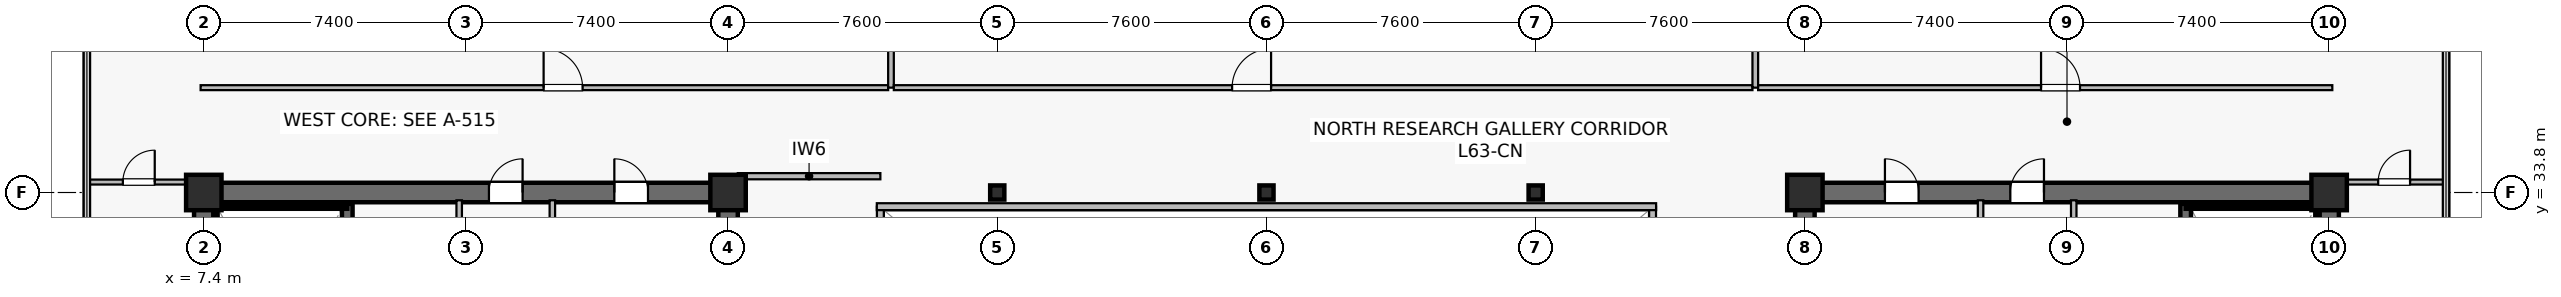
"""IFC4 building model, lengths in metres.
Left out: names, types, materials, properties, quantities, classifications, styles, units other than length and angle.
Written with IfcOpenShell. Run it as: python <this file> out.ifc"""

import sys

from ifc_helpers import new_model, si_unit, direction, frame, frame_2d, origin, origin_2d, place, context, subcontext, project, spatial, rectangle, hollow_rectangle, extrude, source, transform, mapped, element, fill, save


model = new_model("IFC4")
c1 = context("Model", 3, precision=1e-05, world=origin(), true_north=direction((0.0, 1.0)))
c2 = subcontext(c1, "Body", "Model", "MODEL_VIEW")
j1 = project(units=[si_unit("LENGTHUNIT", "METRE"), si_unit("PLANEANGLEUNIT", "RADIAN")], contexts=[c1])
p1 = place(None, origin())
s1 = spatial("IfcSite", under=j1, at=p1, CompositionType="ELEMENT")
p2 = place(p1, origin())
s2 = spatial("IfcBuilding", under=s1, at=p2, CompositionType="ELEMENT")
p3 = place(p2, frame((0.0, 0.0, 262.9)))
s3 = spatial("IfcBuildingStorey", under=s2, at=p3, CompositionType="ELEMENT", Elevation=262.9)
p4 = place(p3, frame((7.125, 33.8, 0.0), z_axis=(0.0, 0.0, 1.0), x_axis=(1.0, 0.0, 0.0)))
e1 = element("IfcWall", 1, at=p4, inside=s3, PredefinedType="SHEAR", context=c2, shape_type="SweptSolid", body=[
    extrude(rectangle(XDim=15.35, YDim=0.55, at=frame_2d((7.675, 0.0))), origin(), (0.0, 0.0, 1.0), 3.8),
])
p5 = place(p4, frame((8.325, 0.0, 0.0)))
e2 = element("IfcOpeningElement", 2, at=p5, cuts=e1, PredefinedType="OPENING", context=c2, shape_type="SweptSolid", body=[
    extrude(rectangle(XDim=0.95, YDim=2.15, at=frame_2d((0.475, 1.075))), frame((0.0, 0.285, 0.0), z_axis=(0.0, -1.0, 0.0), x_axis=(1.0, 0.0, 0.0)), (0.0, 0.0, 1.0), 0.57),
])
p6 = place(p4, frame((11.865, 0.0, 0.0)))
e3 = element("IfcOpeningElement", 3, at=p6, cuts=e1, PredefinedType="OPENING", context=c2, shape_type="SweptSolid", body=[
    extrude(rectangle(XDim=0.95, YDim=2.15, at=frame_2d((0.475, 1.075))), frame((0.0, 0.285, 0.0), z_axis=(0.0, -1.0, 0.0), x_axis=(1.0, 0.0, 0.0)), (0.0, 0.0, 1.0), 0.57),
])
p7 = place(p3, frame((7.4, 15.075, 0.0), z_axis=(0.0, 0.0, 1.0), x_axis=(0.0, 1.0, 0.0)))
e4 = element("IfcWall", 4, at=p7, inside=s3, PredefinedType="SHEAR", context=c2, shape_type="SweptSolid", body=[
    extrude(rectangle(XDim=18.45, YDim=0.55, at=frame_2d((9.225, 0.0))), origin(), (0.0, 0.0, 1.0), 3.8),
])
p8 = place(p3, frame((22.2, 15.075, 0.0), z_axis=(0.0, 0.0, 1.0), x_axis=(0.0, 1.0, 0.0)))
e5 = element("IfcWall", 5, at=p8, inside=s3, PredefinedType="SHEAR", context=c2, shape_type="SweptSolid", body=[
    extrude(rectangle(XDim=18.45, YDim=0.55, at=frame_2d((9.225, 0.0))), origin(), (0.0, 0.0, 1.0), 3.8),
])
p9 = place(p8, frame((3.475, 0.0, 0.0)))
e6 = element("IfcOpeningElement", 6, at=p9, cuts=e5, PredefinedType="OPENING", context=c2, shape_type="SweptSolid", body=[
    extrude(rectangle(XDim=1.42, YDim=2.2, at=frame_2d((0.71, 1.1))), frame((0.0, 0.285, 0.0), z_axis=(0.0, -1.0, 0.0), x_axis=(1.0, 0.0, 0.0)), (0.0, 0.0, 1.0), 0.57),
])
p10 = place(p3, frame((11.45, 24.85, 0.0), z_axis=(0.0, 0.0, 1.0), x_axis=(0.0, 1.0, 0.0)))
e7 = element("IfcWall", 7, at=p10, inside=s3, PredefinedType="SHEAR", context=c2, shape_type="SweptSolid", body=[
    extrude(rectangle(XDim=8.63, YDim=0.3, at=frame_2d((4.315, 0.0))), origin(), (0.0, 0.0, 1.0), 3.8),
])
p11 = place(p10, frame((0.42, 0.0, 0.0)))
e8 = element("IfcOpeningElement", 8, at=p11, cuts=e7, PredefinedType="OPENING", context=c2, shape_type="SweptSolid", body=[
    extrude(rectangle(XDim=1.1, YDim=2.15, at=frame_2d((0.55, 1.075))), frame((0.0, 0.16, 0.0), z_axis=(0.0, -1.0, 0.0), x_axis=(1.0, 0.0, 0.0)), (0.0, 0.0, 1.0), 0.32),
])
p12 = place(p3, frame((7.73, 33.4, 0.0), z_axis=(0.0, 0.0, 1.0), x_axis=(1.0, 0.0, 0.0)))
e9 = element("IfcWall", 9, at=p12, inside=s3, PredefinedType="SOLIDWALL", context=c2, shape_type="SweptSolid", body=[
    extrude(rectangle(XDim=3.72, YDim=0.12, at=frame_2d((1.86, 0.0))), origin(), (0.0, 0.0, 1.0), 3.8),
])
p13 = place(p3, frame((7.73, 25.0, 0.0), z_axis=(0.0, 0.0, 1.0), x_axis=(0.0, 1.0, 0.0)))
e10 = element("IfcWall", 10, at=p13, inside=s3, PredefinedType="SOLIDWALL", context=c2, shape_type="SweptSolid", body=[
    extrude(rectangle(XDim=8.32, YDim=0.12, at=frame_2d((4.16, 0.0))), origin(), (0.0, 0.0, 1.0), 3.8),
])
p14 = place(p3, frame((52.325, 33.8, 0.0), z_axis=(0.0, 0.0, 1.0), x_axis=(1.0, 0.0, 0.0)))
e11 = element("IfcWall", 11, at=p14, inside=s3, PredefinedType="SHEAR", context=c2, shape_type="SweptSolid", body=[
    extrude(rectangle(XDim=15.35, YDim=0.55, at=frame_2d((7.675, 0.0))), origin(), (0.0, 0.0, 1.0), 3.8),
])
p15 = place(p14, frame((6.075, 0.0, 0.0)))
e12 = element("IfcOpeningElement", 12, at=p15, cuts=e11, PredefinedType="OPENING", context=c2, shape_type="SweptSolid", body=[
    extrude(rectangle(XDim=0.95, YDim=2.15, at=frame_2d((0.475, 1.075))), frame((0.0, 0.285, 0.0), z_axis=(0.0, -1.0, 0.0), x_axis=(1.0, 0.0, 0.0)), (0.0, 0.0, 1.0), 0.57),
])
p16 = place(p14, frame((2.535, 0.0, 0.0)))
e13 = element("IfcOpeningElement", 13, at=p16, cuts=e11, PredefinedType="OPENING", context=c2, shape_type="SweptSolid", body=[
    extrude(rectangle(XDim=0.95, YDim=2.15, at=frame_2d((0.475, 1.075))), frame((0.0, 0.285, 0.0), z_axis=(0.0, -1.0, 0.0), x_axis=(1.0, 0.0, 0.0)), (0.0, 0.0, 1.0), 0.57),
])
p17 = place(p3, frame((52.6, 15.075, 0.0), z_axis=(0.0, 0.0, 1.0), x_axis=(0.0, 1.0, 0.0)))
e14 = element("IfcWall", 14, at=p17, inside=s3, PredefinedType="SHEAR", context=c2, shape_type="SweptSolid", body=[
    extrude(rectangle(XDim=18.45, YDim=0.55, at=frame_2d((9.225, 0.0))), origin(), (0.0, 0.0, 1.0), 3.8),
])
p18 = place(p17, frame((3.475, 0.0, 0.0)))
e15 = element("IfcOpeningElement", 15, at=p18, cuts=e14, PredefinedType="OPENING", context=c2, shape_type="SweptSolid", body=[
    extrude(rectangle(XDim=1.42, YDim=2.2, at=frame_2d((0.71, 1.1))), frame((0.0, 0.285, 0.0), z_axis=(0.0, -1.0, 0.0), x_axis=(1.0, 0.0, 0.0)), (0.0, 0.0, 1.0), 0.57),
])
p19 = place(p3, frame((67.4, 15.075, 0.0), z_axis=(0.0, 0.0, 1.0), x_axis=(0.0, 1.0, 0.0)))
e16 = element("IfcWall", 16, at=p19, inside=s3, PredefinedType="SHEAR", context=c2, shape_type="SweptSolid", body=[
    extrude(rectangle(XDim=18.45, YDim=0.55, at=frame_2d((9.225, 0.0))), origin(), (0.0, 0.0, 1.0), 3.8),
])
p20 = place(p3, frame((63.35, 24.85, 0.0), z_axis=(0.0, 0.0, 1.0), x_axis=(0.0, 1.0, 0.0)))
e17 = element("IfcWall", 17, at=p20, inside=s3, PredefinedType="SHEAR", context=c2, shape_type="SweptSolid", body=[
    extrude(rectangle(XDim=8.63, YDim=0.3, at=frame_2d((4.315, 0.0))), origin(), (0.0, 0.0, 1.0), 3.8),
])
p21 = place(p20, frame((0.42, 0.0, 0.0)))
e18 = element("IfcOpeningElement", 18, at=p21, cuts=e17, PredefinedType="OPENING", context=c2, shape_type="SweptSolid", body=[
    extrude(rectangle(XDim=1.1, YDim=2.15, at=frame_2d((0.55, 1.075))), frame((0.0, 0.16, 0.0), z_axis=(0.0, -1.0, 0.0), x_axis=(1.0, 0.0, 0.0)), (0.0, 0.0, 1.0), 0.32),
])
p22 = place(p3, frame((63.35, 33.4, 0.0), z_axis=(0.0, 0.0, 1.0), x_axis=(1.0, 0.0, 0.0)))
e19 = element("IfcWall", 19, at=p22, inside=s3, PredefinedType="SOLIDWALL", context=c2, shape_type="SweptSolid", body=[
    extrude(rectangle(XDim=3.72, YDim=0.12, at=frame_2d((1.86, 0.0))), origin(), (0.0, 0.0, 1.0), 3.8),
])
p23 = place(p3, frame((67.07, 25.0, 0.0), z_axis=(0.0, 0.0, 1.0), x_axis=(0.0, 1.0, 0.0)))
e20 = element("IfcWall", 20, at=p23, inside=s3, PredefinedType="SOLIDWALL", context=c2, shape_type="SweptSolid", body=[
    extrude(rectangle(XDim=8.32, YDim=0.12, at=frame_2d((4.16, 0.0))), origin(), (0.0, 0.0, 1.0), 3.8),
])
m1 = source(origin(), c2, "Body", "SweptSolid", [
    extrude(rectangle(XDim=1.0, YDim=1.0, at=origin_2d()), origin(), (0.0, 0.0, 1.0), 4.1),
])
for number, where, z_axis, x_axis in (
    (21, (7.4, 33.8, 0.0), (0.0, 0.0, 1.0), (1.0, 0.0, 0.0)),
    (22, (22.2, 33.8, 0.0), (0.0, 0.0, 1.0), (1.0, 0.0, 0.0)),
    (23, (52.6, 33.8, 0.0), (0.0, 0.0, 1.0), (1.0, 0.0, 0.0)),
    (24, (67.4, 33.8, 0.0), (0.0, 0.0, 1.0), (1.0, 0.0, 0.0)),
):
    element("IfcColumn", number, at=place(p3, frame(where, z_axis=z_axis, x_axis=x_axis)), inside=s3, PredefinedType="COLUMN", context=c2, shape_type="MappedRepresentation", body=[
        mapped(m1, transform((0.0, 0.0, 0.0), scale=1.0)),
    ])
m2 = source(origin(), c2, "Body", "SweptSolid", [
    extrude(hollow_rectangle(XDim=0.4, YDim=0.4, WallThickness=0.019, at=origin_2d()), origin(), (0.0, 0.0, 1.0), 4.1),
])
for number, where, z_axis, x_axis in (
    (25, (29.8, 33.8, 0.0), (0.0, 0.0, 1.0), (1.0, 0.0, 0.0)),
    (26, (37.4, 33.8, 0.0), (0.0, 0.0, 1.0), (1.0, 0.0, 0.0)),
    (27, (45.0, 33.8, 0.0), (0.0, 0.0, 1.0), (1.0, 0.0, 0.0)),
):
    element("IfcColumn", number, at=place(p3, frame(where, z_axis=z_axis, x_axis=x_axis)), inside=s3, PredefinedType="COLUMN", context=c2, shape_type="MappedRepresentation", body=[
        mapped(m2, transform((0.0, 0.0, 0.0), scale=1.0)),
    ])
p24 = place(p3, frame((14.61, 29.65, 0.0), z_axis=(0.0, 0.0, 1.0), x_axis=(0.0, 1.0, 0.0)))
e28 = element("IfcWall", 28, at=p24, inside=s3, PredefinedType="PLUMBINGWALL", context=c2, shape_type="SweptSolid", body=[
    extrude(rectangle(XDim=3.93, YDim=0.155, at=frame_2d((1.965, 0.0))), origin(), (0.0, 0.0, 1.0), 3.197),
])
p25 = place(p3, frame((17.24, 29.65, 0.0), z_axis=(0.0, 0.0, 1.0), x_axis=(0.0, 1.0, 0.0)))
e29 = element("IfcWall", 29, at=p25, inside=s3, PredefinedType="PLUMBINGWALL", context=c2, shape_type="SweptSolid", body=[
    extrude(rectangle(XDim=3.93, YDim=0.155, at=frame_2d((1.965, 0.0))), origin(), (0.0, 0.0, 1.0), 3.8),
])
p26 = place(p3, frame((60.19, 29.65, 0.0), z_axis=(0.0, 0.0, 1.0), x_axis=(0.0, 1.0, 0.0)))
e30 = element("IfcWall", 30, at=p26, inside=s3, PredefinedType="PLUMBINGWALL", context=c2, shape_type="SweptSolid", body=[
    extrude(rectangle(XDim=3.93, YDim=0.155, at=frame_2d((1.965, 0.0))), origin(), (0.0, 0.0, 1.0), 3.197),
])
p27 = place(p3, frame((57.56, 29.65, 0.0), z_axis=(0.0, 0.0, 1.0), x_axis=(0.0, 1.0, 0.0)))
e31 = element("IfcWall", 31, at=p27, inside=s3, PredefinedType="PLUMBINGWALL", context=c2, shape_type="SweptSolid", body=[
    extrude(rectangle(XDim=3.93, YDim=0.155, at=frame_2d((1.965, 0.0))), origin(), (0.0, 0.0, 1.0), 3.8),
])
p28 = place(p3, frame((22.475, 34.26, 0.0), z_axis=(0.0, 0.0, 1.0), x_axis=(1.0, 0.0, 0.0)))
e32 = element("IfcWall", 32, at=p28, inside=s3, PredefinedType="PARTITIONING", context=c2, shape_type="SweptSolid", body=[
    extrude(rectangle(XDim=4.025, YDim=0.175, at=frame_2d((2.012, 0.0))), origin(), (0.0, 0.0, 1.0), 3.535),
])
p29 = place(p3, frame((26.5, 15.2, 0.0), z_axis=(0.0, 0.0, 1.0), x_axis=(0.0, 1.0, 0.0)))
e33 = element("IfcWall", 33, at=p29, inside=s3, PredefinedType="SOLIDWALL", context=c2, shape_type="SweptSolid", body=[
    extrude(rectangle(XDim=18.2, YDim=0.195, at=frame_2d((9.1, 0.0))), origin(), (0.0, 0.0, 1.0), 3.8),
])
p30 = place(p29, frame((1.8, 0.0, 0.9)))
e34 = element("IfcOpeningElement", 34, at=p30, cuts=e33, PredefinedType="OPENING", context=c2, shape_type="SweptSolid", body=[
    extrude(rectangle(XDim=1.2, YDim=1.35, at=frame_2d((0.6, 0.675))), frame((0.0, 0.107, 0.0), z_axis=(0.0, -1.0, 0.0), x_axis=(1.0, 0.0, 0.0)), (0.0, 0.0, 1.0), 0.215),
])
p31 = place(p29, frame((13.2, 0.0, 0.9)))
e35 = element("IfcOpeningElement", 35, at=p31, cuts=e33, PredefinedType="OPENING", context=c2, shape_type="SweptSolid", body=[
    extrude(rectangle(XDim=1.2, YDim=1.35, at=frame_2d((0.6, 0.675))), frame((0.0, 0.107, 0.0), z_axis=(0.0, -1.0, 0.0), x_axis=(1.0, 0.0, 0.0)), (0.0, 0.0, 1.0), 0.215),
])
p32 = place(p3, frame((48.3, 15.2, 0.0), z_axis=(0.0, 0.0, 1.0), x_axis=(0.0, 1.0, 0.0)))
e36 = element("IfcWall", 36, at=p32, inside=s3, PredefinedType="SOLIDWALL", context=c2, shape_type="SweptSolid", body=[
    extrude(rectangle(XDim=18.2, YDim=0.195, at=frame_2d((9.1, 0.0))), origin(), (0.0, 0.0, 1.0), 3.8),
])
p33 = place(p32, frame((1.8, 0.0, 0.9)))
e37 = element("IfcOpeningElement", 37, at=p33, cuts=e36, PredefinedType="OPENING", context=c2, shape_type="SweptSolid", body=[
    extrude(rectangle(XDim=1.2, YDim=1.35, at=frame_2d((0.6, 0.675))), frame((0.0, 0.107, 0.0), z_axis=(0.0, -1.0, 0.0), x_axis=(1.0, 0.0, 0.0)), (0.0, 0.0, 1.0), 0.215),
])
p34 = place(p32, frame((13.2, 0.0, 0.9)))
e38 = element("IfcOpeningElement", 38, at=p34, cuts=e36, PredefinedType="OPENING", context=c2, shape_type="SweptSolid", body=[
    extrude(rectangle(XDim=1.2, YDim=1.35, at=frame_2d((0.6, 0.675))), frame((0.0, 0.107, 0.0), z_axis=(0.0, -1.0, 0.0), x_axis=(1.0, 0.0, 0.0)), (0.0, 0.0, 1.0), 0.215),
])
p35 = place(p3, frame((26.4, 33.4, 0.0), z_axis=(0.0, 0.0, 1.0), x_axis=(1.0, 0.0, 0.0)))
e39 = element("IfcWall", 39, at=p35, inside=s3, PredefinedType="SOLIDWALL", context=c2, shape_type="SweptSolid", body=[
    extrude(rectangle(XDim=22.0, YDim=0.195, at=frame_2d((11.0, 0.0))), origin(), (0.0, 0.0, 1.0), 3.8),
])
p36 = place(p3, frame((7.31, 36.76, 0.0), z_axis=(0.0, 0.0, 1.0), x_axis=(1.0, 0.0, 0.0)))
e40 = element("IfcWall", 40, at=p36, inside=s3, PredefinedType="PARTITIONING", context=c2, shape_type="SweptSolid", body=[
    extrude(rectangle(XDim=19.41, YDim=0.14, at=frame_2d((9.705, 0.0))), origin(), (0.0, 0.0, 1.0), 3.197),
])
p37 = place(p36, frame((9.683, 0.0, 0.0)))
e41 = element("IfcOpeningElement", 41, at=p37, cuts=e40, PredefinedType="OPENING", context=c2, shape_type="SweptSolid", body=[
    extrude(rectangle(XDim=1.1, YDim=2.18, at=frame_2d((0.55, 1.09))), frame((0.0, 0.08, 0.0), z_axis=(0.0, -1.0, 0.0), x_axis=(1.0, 0.0, 0.0)), (0.0, 0.0, 1.0), 0.16),
])
p38 = place(p3, frame((26.8, 36.76, 0.0), z_axis=(0.0, 0.0, 1.0), x_axis=(0.0, 1.0, 0.0)))
e42 = element("IfcWall", 42, at=p38, inside=s3, PredefinedType="PARTITIONING", context=c2, shape_type="SweptSolid", body=[
    extrude(rectangle(XDim=7.93, YDim=0.16, at=frame_2d((3.965, 0.0))), origin(), (0.0, 0.0, 1.0), 3.135),
])
p39 = place(p3, frame((26.88, 36.76, 0.0), z_axis=(0.0, 0.0, 1.0), x_axis=(1.0, 0.0, 0.0)))
e43 = element("IfcWall", 43, at=p39, inside=s3, PredefinedType="PARTITIONING", context=c2, shape_type="SweptSolid", body=[
    extrude(rectangle(XDim=24.24, YDim=0.14, at=frame_2d((12.12, 0.0))), origin(), (0.0, 0.0, 1.0), 3.197),
])
p40 = place(p39, frame((9.55, 0.0, 0.0)))
e44 = element("IfcOpeningElement", 44, at=p40, cuts=e43, PredefinedType="OPENING", context=c2, shape_type="SweptSolid", body=[
    extrude(rectangle(XDim=1.1, YDim=2.18, at=frame_2d((0.55, 1.09))), frame((0.0, 0.08, 0.0), z_axis=(0.0, -1.0, 0.0), x_axis=(1.0, 0.0, 0.0)), (0.0, 0.0, 1.0), 0.16),
])
p41 = place(p3, frame((51.2, 36.76, 0.0), z_axis=(0.0, 0.0, 1.0), x_axis=(0.0, 1.0, 0.0)))
e45 = element("IfcWall", 45, at=p41, inside=s3, PredefinedType="PARTITIONING", context=c2, shape_type="SweptSolid", body=[
    extrude(rectangle(XDim=9.13, YDim=0.16, at=frame_2d((4.565, 0.0))), origin(), (0.0, 0.0, 1.0), 3.135),
])
p42 = place(p3, frame((51.28, 36.76, 0.0), z_axis=(0.0, 0.0, 1.0), x_axis=(1.0, 0.0, 0.0)))
e46 = element("IfcWall", 46, at=p42, inside=s3, PredefinedType="PARTITIONING", context=c2, shape_type="SweptSolid", body=[
    extrude(rectangle(XDim=16.21, YDim=0.14, at=frame_2d((8.105, 0.0))), origin(), (0.0, 0.0, 1.0), 3.197),
])
p43 = place(p42, frame((7.987, 0.0, 0.0)))
e47 = element("IfcOpeningElement", 47, at=p43, cuts=e46, PredefinedType="OPENING", context=c2, shape_type="SweptSolid", body=[
    extrude(rectangle(XDim=1.1, YDim=2.18, at=frame_2d((0.55, 1.09))), frame((0.0, 0.08, 0.0), z_axis=(0.0, -1.0, 0.0), x_axis=(1.0, 0.0, 0.0)), (0.0, 0.0, 1.0), 0.16),
])
p44 = place(p3, frame((4.11, 34.095, 0.0), z_axis=(0.0, 0.0, 1.0), x_axis=(1.0, 0.0, 0.0)))
e48 = element("IfcWall", 48, at=p44, inside=s3, PredefinedType="PARTITIONING", context=c2, shape_type="SweptSolid", body=[
    extrude(rectangle(XDim=2.91, YDim=0.14, at=frame_2d((1.455, 0.0))), origin(), (0.0, 0.0, 1.0), 3.8),
])
p45 = place(p44, frame((1.005, 0.0, 0.0)))
e49 = element("IfcOpeningElement", 49, at=p45, cuts=e48, PredefinedType="OPENING", context=c2, shape_type="SweptSolid", body=[
    extrude(rectangle(XDim=0.9, YDim=2.1, at=frame_2d((0.45, 1.05))), frame((0.0, 0.08, 0.0), z_axis=(0.0, -1.0, 0.0), x_axis=(1.0, 0.0, 0.0)), (0.0, 0.0, 1.0), 0.16),
])
p46 = place(p3, frame((67.78, 34.095, 0.0), z_axis=(0.0, 0.0, 1.0), x_axis=(1.0, 0.0, 0.0)))
e50 = element("IfcWall", 50, at=p46, inside=s3, PredefinedType="PARTITIONING", context=c2, shape_type="SweptSolid", body=[
    extrude(rectangle(XDim=2.91, YDim=0.14, at=frame_2d((1.455, 0.0))), origin(), (0.0, 0.0, 1.0), 3.8),
])
p47 = place(p46, frame((1.005, 0.0, 0.0)))
e51 = element("IfcOpeningElement", 51, at=p47, cuts=e50, PredefinedType="OPENING", context=c2, shape_type="SweptSolid", body=[
    extrude(rectangle(XDim=0.9, YDim=2.1, at=frame_2d((0.45, 1.05))), frame((0.0, 0.08, 0.0), z_axis=(0.0, -1.0, 0.0), x_axis=(1.0, 0.0, 0.0)), (0.0, 0.0, 1.0), 0.16),
])
m3 = source(origin(), c2, "Body", "SweptSolid", [
    extrude(rectangle(XDim=0.95, YDim=2.15, at=frame_2d((0.475, 1.075))), frame((0.0, 0.025, 0.0), z_axis=(0.0, -1.0, 0.0), x_axis=(1.0, 0.0, 0.0)), (0.0, 0.0, 1.0), 0.05),
])
p48 = place(p5, origin())
e52 = element("IfcDoor", 52, at=p48, inside=s3, OperationType="SINGLE_SWING_RIGHT", PredefinedType="DOOR", context=c2, shape_type="MappedRepresentation", body=[
    mapped(m3, transform((0.0, 0.0, 0.0), scale=1.0)),
])
fill(e2, e52)
p49 = place(p6, origin())
e53 = element("IfcDoor", 53, at=p49, inside=s3, OperationType="SINGLE_SWING_LEFT", PredefinedType="DOOR", context=c2, shape_type="MappedRepresentation", body=[
    mapped(m3, transform((0.0, 0.0, 0.0), scale=1.0)),
])
fill(e3, e53)
p50 = place(p15, origin())
e54 = element("IfcDoor", 54, at=p50, inside=s3, OperationType="SINGLE_SWING_RIGHT", PredefinedType="DOOR", context=c2, shape_type="MappedRepresentation", body=[
    mapped(m3, transform((0.0, 0.0, 0.0), scale=1.0)),
])
fill(e12, e54)
p51 = place(p16, origin())
e55 = element("IfcDoor", 55, at=p51, inside=s3, OperationType="SINGLE_SWING_LEFT", PredefinedType="DOOR", context=c2, shape_type="MappedRepresentation", body=[
    mapped(m3, transform((0.0, 0.0, 0.0), scale=1.0)),
])
fill(e13, e55)
m4 = source(origin(), c2, "Body", "SweptSolid", [
    extrude(rectangle(XDim=1.1, YDim=2.18, at=frame_2d((0.55, 1.09))), frame((0.0, 0.025, 0.0), z_axis=(0.0, -1.0, 0.0), x_axis=(1.0, 0.0, 0.0)), (0.0, 0.0, 1.0), 0.05),
])
p52 = place(p37, origin())
e56 = element("IfcDoor", 56, at=p52, inside=s3, OperationType="SINGLE_SWING_LEFT", PredefinedType="DOOR", context=c2, shape_type="MappedRepresentation", body=[
    mapped(m4, transform((0.0, 0.0, 0.0), scale=1.0)),
])
fill(e41, e56)
p53 = place(p40, origin())
e57 = element("IfcDoor", 57, at=p53, inside=s3, OperationType="SINGLE_SWING_RIGHT", PredefinedType="DOOR", context=c2, shape_type="MappedRepresentation", body=[
    mapped(m4, transform((0.0, 0.0, 0.0), scale=1.0)),
])
fill(e44, e57)
p54 = place(p43, origin())
e58 = element("IfcDoor", 58, at=p54, inside=s3, OperationType="SINGLE_SWING_LEFT", PredefinedType="DOOR", context=c2, shape_type="MappedRepresentation", body=[
    mapped(m4, transform((0.0, 0.0, 0.0), scale=1.0)),
])
fill(e47, e58)
m5 = source(origin(), c2, "Body", "SweptSolid", [
    extrude(rectangle(XDim=0.9, YDim=2.1, at=frame_2d((0.45, 1.05))), frame((0.0, 0.025, 0.0), z_axis=(0.0, -1.0, 0.0), x_axis=(1.0, 0.0, 0.0)), (0.0, 0.0, 1.0), 0.05),
])
p55 = place(p45, origin())
e59 = element("IfcDoor", 59, at=p55, inside=s3, OperationType="SINGLE_SWING_RIGHT", PredefinedType="DOOR", context=c2, shape_type="MappedRepresentation", body=[
    mapped(m5, transform((0.0, 0.0, 0.0), scale=1.0)),
])
fill(e49, e59)
p56 = place(p47, origin())
e60 = element("IfcDoor", 60, at=p56, inside=s3, OperationType="SINGLE_SWING_RIGHT", PredefinedType="DOOR", context=c2, shape_type="MappedRepresentation", body=[
    mapped(m5, transform((0.0, 0.0, 0.0), scale=1.0)),
])
fill(e51, e60)
save(model, sys.argv[1])
